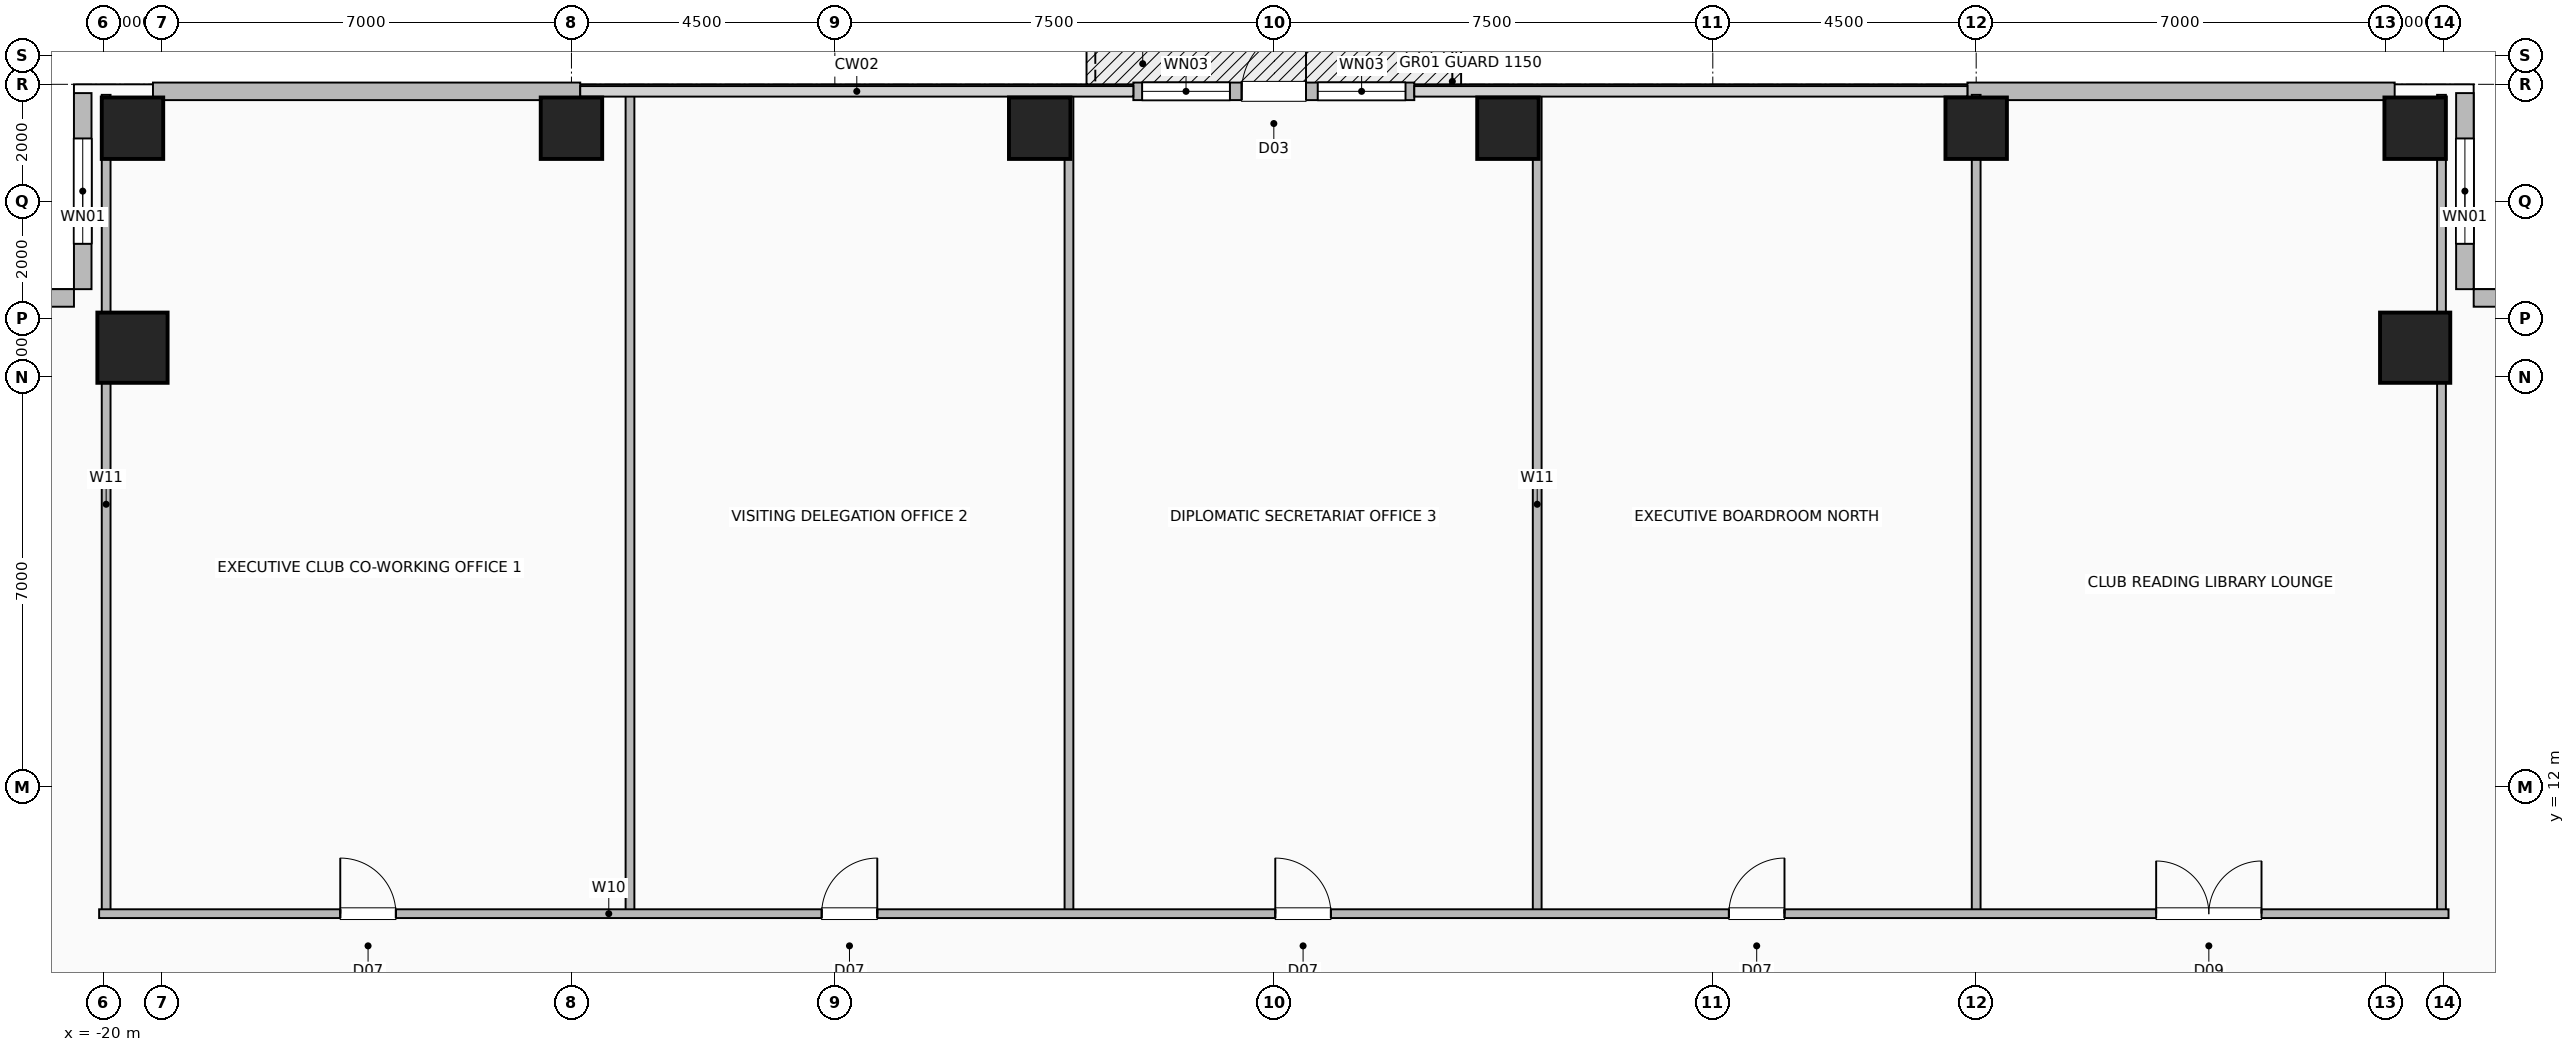
"""IFC4 building model, lengths in metres.
Left out: names, types, materials, properties, quantities, classifications, styles, units other than length and angle.
Written with IfcOpenShell. Run it as: python <this file> out.ifc"""

import sys

from ifc_helpers import new_model, si_unit, direction, frame, frame_2d, origin, origin_2d, place, context, subcontext, project, spatial, rectangle, hollow_rectangle, extrude, element, fill, save


model = new_model("IFC4")
c1 = context("Model", 3, precision=1e-05, world=origin(), true_north=direction((0.0, 1.0)))
c2 = subcontext(c1, "Body", "Model", "MODEL_VIEW")
j1 = project(units=[si_unit("LENGTHUNIT", "METRE"), si_unit("PLANEANGLEUNIT", "RADIAN")], contexts=[c1])
p1 = place(None, origin())
s1 = spatial("IfcSite", under=j1, at=p1, CompositionType="ELEMENT")
p2 = place(p1, origin())
s2 = spatial("IfcBuilding", under=s1, at=p2, CompositionType="ELEMENT")
p3 = place(p2, frame((0.0, 0.0, 65.5)))
s3 = spatial("IfcBuildingStorey", under=s2, at=p3, CompositionType="ELEMENT", Elevation=65.5)
for number, where, z_axis, x_axis in (
    (1, (-19.5, 23.25, 0.0), (0.0, 0.0, 1.0), (1.0, 0.0, 0.0)),
    (2, (-12.0, 23.25, 0.0), (0.0, 0.0, 1.0), (1.0, 0.0, 0.0)),
    (3, (-4.0, 23.25, 0.0), (0.0, 0.0, 1.0), (1.0, 0.0, 0.0)),
    (4, (4.0, 23.25, 0.0), (0.0, 0.0, 1.0), (1.0, 0.0, 0.0)),
    (5, (12.0, 23.25, 0.0), (0.0, 0.0, 1.0), (1.0, 0.0, 0.0)),
    (6, (19.5, 23.25, 0.0), (0.0, 0.0, 1.0), (1.0, 0.0, 0.0)),
):
    element("IfcColumn", number, at=place(p3, frame(where, z_axis=z_axis, x_axis=x_axis)), inside=s3, PredefinedType="COLUMN", context=c2, shape_type="SweptSolid", body=[
        extrude(hollow_rectangle(XDim=1.05, YDim=1.05, WallThickness=0.05, at=origin_2d()), origin(), (0.0, 0.0, 1.0), 3.5),
    ])
for number, where, z_axis, x_axis in (
    (7, (19.5, 19.5, 0.0), (0.0, 0.0, 1.0), (1.0, 0.0, 0.0)),
    (8, (-19.5, 19.5, 0.0), (0.0, 0.0, 1.0), (1.0, 0.0, 0.0)),
):
    element("IfcColumn", number, at=place(p3, frame(where, z_axis=z_axis, x_axis=x_axis)), inside=s3, PredefinedType="COLUMN", context=c2, shape_type="SweptSolid", body=[
        extrude(hollow_rectangle(XDim=1.2, YDim=1.2, WallThickness=0.055, at=origin_2d()), origin(), (0.0, 0.0, 1.0), 3.5),
    ])
for number, where, z_axis, x_axis in (
    (9, (-19.15, 23.88, 0.0), (0.0, 0.0, 1.0), (1.0, 0.0, 0.0)),
    (10, (11.85, 23.88, 0.0), (0.0, 0.0, 1.0), (1.0, 0.0, 0.0)),
):
    element("IfcWall", number, at=place(p3, frame(where, z_axis=z_axis, x_axis=x_axis)), inside=s3, PredefinedType="SOLIDWALL", context=c2, shape_type="SweptSolid", body=[
        extrude(rectangle(XDim=7.3, YDim=0.3, at=frame_2d((3.65, 0.0))), origin(), (0.0, 0.0, 1.0), 3.25),
    ])
p4 = place(p3, frame((-2.4, 23.88, 0.0), z_axis=(0.0, 0.0, 1.0), x_axis=(1.0, 0.0, 0.0)))
e11 = element("IfcWall", 11, at=p4, inside=s3, PredefinedType="SOLIDWALL", context=c2, shape_type="SweptSolid", body=[
    extrude(rectangle(XDim=4.8, YDim=0.3, at=frame_2d((2.4, 0.0))), origin(), (0.0, 0.0, 1.0), 3.25),
])
p5 = place(p4, frame((1.85, 0.0, 0.0)))
e12 = element("IfcOpeningElement", 12, at=p5, cuts=e11, PredefinedType="OPENING", context=c2, shape_type="SweptSolid", body=[
    extrude(rectangle(XDim=1.1, YDim=2.2, at=frame_2d((0.55, 1.1))), frame((0.0, 0.16, 0.0), z_axis=(0.0, -1.0, 0.0), x_axis=(1.0, 0.0, 0.0)), (0.0, 0.0, 1.0), 0.32),
])
p6 = place(p4, frame((0.15, 0.0, 0.85)))
e13 = element("IfcOpeningElement", 13, at=p6, cuts=e11, PredefinedType="OPENING", context=c2, shape_type="SweptSolid", body=[
    extrude(rectangle(XDim=1.5, YDim=1.8, at=frame_2d((0.75, 0.9))), frame((0.0, 0.16, 0.0), z_axis=(0.0, -1.0, 0.0), x_axis=(1.0, 0.0, 0.0)), (0.0, 0.0, 1.0), 0.32),
])
p7 = place(p4, frame((3.15, 0.0, 0.85)))
e14 = element("IfcOpeningElement", 14, at=p7, cuts=e11, PredefinedType="OPENING", context=c2, shape_type="SweptSolid", body=[
    extrude(rectangle(XDim=1.5, YDim=1.8, at=frame_2d((0.75, 0.9))), frame((0.0, 0.16, 0.0), z_axis=(0.0, -1.0, 0.0), x_axis=(1.0, 0.0, 0.0)), (0.0, 0.0, 1.0), 0.32),
])
p8 = place(p3, frame((20.35, 23.85, 0.0), z_axis=(0.0, 0.0, 1.0), x_axis=(0.0, -1.0, 0.0)))
e15 = element("IfcWall", 15, at=p8, inside=s3, PredefinedType="SOLIDWALL", context=c2, shape_type="SweptSolid", body=[
    extrude(rectangle(XDim=3.35, YDim=0.3, at=frame_2d((1.675, 0.0))), origin(), (0.0, 0.0, 1.0), 3.25),
])
p9 = place(p8, frame((0.775, 0.0, 0.9)))
e16 = element("IfcOpeningElement", 16, at=p9, cuts=e15, PredefinedType="OPENING", context=c2, shape_type="SweptSolid", body=[
    extrude(rectangle(XDim=1.8, YDim=1.8, at=frame_2d((0.9, 0.9))), frame((0.0, 0.16, 0.0), z_axis=(0.0, -1.0, 0.0), x_axis=(1.0, 0.0, 0.0)), (0.0, 0.0, 1.0), 0.32),
])
p10 = place(p3, frame((23.85, 20.35, 0.0), z_axis=(0.0, 0.0, 1.0), x_axis=(-1.0, 0.0, 0.0)))
e17 = element("IfcWall", 17, at=p10, inside=s3, PredefinedType="SOLIDWALL", context=c2, shape_type="SweptSolid", body=[
    extrude(rectangle(XDim=3.35, YDim=0.3, at=frame_2d((1.675, 0.0))), origin(), (0.0, 0.0, 1.0), 3.25),
])
p11 = place(p3, frame((-20.35, 23.85, 0.0), z_axis=(0.0, 0.0, 1.0), x_axis=(0.0, -1.0, 0.0)))
e18 = element("IfcWall", 18, at=p11, inside=s3, PredefinedType="SOLIDWALL", context=c2, shape_type="SweptSolid", body=[
    extrude(rectangle(XDim=3.35, YDim=0.3, at=frame_2d((1.675, 0.0))), origin(), (0.0, 0.0, 1.0), 3.25),
])
p12 = place(p11, frame((0.775, 0.0, 0.9)))
e19 = element("IfcOpeningElement", 19, at=p12, cuts=e18, PredefinedType="OPENING", context=c2, shape_type="SweptSolid", body=[
    extrude(rectangle(XDim=1.8, YDim=1.8, at=frame_2d((0.9, 0.9))), frame((0.0, 0.16, 0.0), z_axis=(0.0, -1.0, 0.0), x_axis=(1.0, 0.0, 0.0)), (0.0, 0.0, 1.0), 0.32),
])
p13 = place(p3, frame((-23.85, 20.35, 0.0), z_axis=(0.0, 0.0, 1.0), x_axis=(1.0, 0.0, 0.0)))
e20 = element("IfcWall", 20, at=p13, inside=s3, PredefinedType="SOLIDWALL", context=c2, shape_type="SweptSolid", body=[
    extrude(rectangle(XDim=3.35, YDim=0.3, at=frame_2d((1.675, 0.0))), origin(), (0.0, 0.0, 1.0), 3.25),
])
for number, where, z_axis, x_axis in (
    (21, (-19.95, 9.83, 0.0), (0.0, 0.0, 1.0), (0.0, 1.0, 0.0)),
    (22, (-11.0, 9.83, 0.0), (0.0, 0.0, 1.0), (0.0, 1.0, 0.0)),
    (23, (-3.5, 9.83, 0.0), (0.0, 0.0, 1.0), (0.0, 1.0, 0.0)),
    (24, (4.5, 9.83, 0.0), (0.0, 0.0, 1.0), (0.0, 1.0, 0.0)),
    (25, (12.0, 9.83, 0.0), (0.0, 0.0, 1.0), (0.0, 1.0, 0.0)),
    (26, (19.95, 9.83, 0.0), (0.0, 0.0, 1.0), (0.0, 1.0, 0.0)),
):
    element("IfcWall", number, at=place(p3, frame(where, z_axis=z_axis, x_axis=x_axis)), inside=s3, PredefinedType="PARTITIONING", context=c2, shape_type="SweptSolid", body=[
        extrude(rectangle(XDim=13.99, YDim=0.15, at=frame_2d((6.995, 0.0))), origin(), (0.0, 0.0, 1.0), 3.25),
    ])
p14 = place(p3, frame((-20.07, 9.83, 0.0), z_axis=(0.0, 0.0, 1.0), x_axis=(1.0, 0.0, 0.0)))
e27 = element("IfcWall", 27, at=p14, inside=s3, PredefinedType="PARTITIONING", context=c2, shape_type="SweptSolid", body=[
    extrude(rectangle(XDim=40.14, YDim=0.15, at=frame_2d((20.07, 0.0))), origin(), (0.0, 0.0, 1.0), 3.25),
])
p15 = place(p14, frame((4.12, 0.0, 0.0)))
e28 = element("IfcOpeningElement", 28, at=p15, cuts=e27, PredefinedType="OPENING", context=c2, shape_type="SweptSolid", body=[
    extrude(rectangle(XDim=0.95, YDim=2.06, at=frame_2d((0.475, 1.03))), frame((0.0, 0.085, 0.0), z_axis=(0.0, -1.0, 0.0), x_axis=(1.0, 0.0, 0.0)), (0.0, 0.0, 1.0), 0.17),
])
p16 = place(p14, frame((12.345, 0.0, 0.0)))
e29 = element("IfcOpeningElement", 29, at=p16, cuts=e27, PredefinedType="OPENING", context=c2, shape_type="SweptSolid", body=[
    extrude(rectangle(XDim=0.95, YDim=2.06, at=frame_2d((0.475, 1.03))), frame((0.0, 0.085, 0.0), z_axis=(0.0, -1.0, 0.0), x_axis=(1.0, 0.0, 0.0)), (0.0, 0.0, 1.0), 0.17),
])
p17 = place(p14, frame((20.095, 0.0, 0.0)))
e30 = element("IfcOpeningElement", 30, at=p17, cuts=e27, PredefinedType="OPENING", context=c2, shape_type="SweptSolid", body=[
    extrude(rectangle(XDim=0.95, YDim=2.06, at=frame_2d((0.475, 1.03))), frame((0.0, 0.085, 0.0), z_axis=(0.0, -1.0, 0.0), x_axis=(1.0, 0.0, 0.0)), (0.0, 0.0, 1.0), 0.17),
])
p18 = place(p14, frame((27.845, 0.0, 0.0)))
e31 = element("IfcOpeningElement", 31, at=p18, cuts=e27, PredefinedType="OPENING", context=c2, shape_type="SweptSolid", body=[
    extrude(rectangle(XDim=0.95, YDim=2.06, at=frame_2d((0.475, 1.03))), frame((0.0, 0.085, 0.0), z_axis=(0.0, -1.0, 0.0), x_axis=(1.0, 0.0, 0.0)), (0.0, 0.0, 1.0), 0.17),
])
p19 = place(p14, frame((35.145, 0.0, 0.0)))
e32 = element("IfcOpeningElement", 32, at=p19, cuts=e27, PredefinedType="OPENING", context=c2, shape_type="SweptSolid", body=[
    extrude(rectangle(XDim=1.8, YDim=2.08, at=frame_2d((0.9, 1.04))), frame((0.0, 0.085, 0.0), z_axis=(0.0, -1.0, 0.0), x_axis=(1.0, 0.0, 0.0)), (0.0, 0.0, 1.0), 0.17),
])
p20 = place(p5, origin())
e33 = element("IfcDoor", 33, at=p20, inside=s3, OperationType="SINGLE_SWING_RIGHT", PredefinedType="DOOR", context=c2, shape_type="SweptSolid", body=[
    extrude(rectangle(XDim=1.1, YDim=2.2, at=frame_2d((0.55, 1.1))), frame((0.0, 0.025, 0.0), z_axis=(0.0, -1.0, 0.0), x_axis=(1.0, 0.0, 0.0)), (0.0, 0.0, 1.0), 0.05),
])
fill(e12, e33)
p21 = place(p6, origin())
e34 = element("IfcWindow", 34, at=p21, inside=s3, PartitioningType="SINGLE_PANEL", PredefinedType="WINDOW", context=c2, shape_type="SweptSolid", body=[
    extrude(rectangle(XDim=1.5, YDim=1.8, at=frame_2d((0.75, 0.9))), frame((0.0, 0.03, 0.0), z_axis=(0.0, -1.0, 0.0), x_axis=(1.0, 0.0, 0.0)), (0.0, 0.0, 1.0), 0.06),
])
fill(e13, e34)
p22 = place(p7, origin())
e35 = element("IfcWindow", 35, at=p22, inside=s3, PartitioningType="SINGLE_PANEL", PredefinedType="WINDOW", context=c2, shape_type="SweptSolid", body=[
    extrude(rectangle(XDim=1.5, YDim=1.8, at=frame_2d((0.75, 0.9))), frame((0.0, 0.03, 0.0), z_axis=(0.0, -1.0, 0.0), x_axis=(1.0, 0.0, 0.0)), (0.0, 0.0, 1.0), 0.06),
])
fill(e14, e35)
p23 = place(p9, origin())
e36 = element("IfcWindow", 36, at=p23, inside=s3, PartitioningType="SINGLE_PANEL", PredefinedType="WINDOW", context=c2, shape_type="SweptSolid", body=[
    extrude(rectangle(XDim=1.8, YDim=1.8, at=frame_2d((0.9, 0.9))), frame((0.0, 0.03, 0.0), z_axis=(0.0, -1.0, 0.0), x_axis=(1.0, 0.0, 0.0)), (0.0, 0.0, 1.0), 0.06),
])
fill(e16, e36)
p24 = place(p12, origin())
e37 = element("IfcWindow", 37, at=p24, inside=s3, PartitioningType="SINGLE_PANEL", PredefinedType="WINDOW", context=c2, shape_type="SweptSolid", body=[
    extrude(rectangle(XDim=1.8, YDim=1.8, at=frame_2d((0.9, 0.9))), frame((0.0, 0.03, 0.0), z_axis=(0.0, -1.0, 0.0), x_axis=(1.0, 0.0, 0.0)), (0.0, 0.0, 1.0), 0.06),
])
fill(e19, e37)
p25 = place(p15, origin())
e38 = element("IfcDoor", 38, at=p25, inside=s3, OperationType="SINGLE_SWING_LEFT", PredefinedType="DOOR", context=c2, shape_type="SweptSolid", body=[
    extrude(rectangle(XDim=0.95, YDim=2.06, at=frame_2d((0.475, 1.03))), frame((0.0, 0.025, 0.0), z_axis=(0.0, -1.0, 0.0), x_axis=(1.0, 0.0, 0.0)), (0.0, 0.0, 1.0), 0.05),
])
fill(e28, e38)
p26 = place(p16, origin())
e39 = element("IfcDoor", 39, at=p26, inside=s3, OperationType="SINGLE_SWING_RIGHT", PredefinedType="DOOR", context=c2, shape_type="SweptSolid", body=[
    extrude(rectangle(XDim=0.95, YDim=2.06, at=frame_2d((0.475, 1.03))), frame((0.0, 0.025, 0.0), z_axis=(0.0, -1.0, 0.0), x_axis=(1.0, 0.0, 0.0)), (0.0, 0.0, 1.0), 0.05),
])
fill(e29, e39)
p27 = place(p17, origin())
e40 = element("IfcDoor", 40, at=p27, inside=s3, OperationType="SINGLE_SWING_LEFT", PredefinedType="DOOR", context=c2, shape_type="SweptSolid", body=[
    extrude(rectangle(XDim=0.95, YDim=2.06, at=frame_2d((0.475, 1.03))), frame((0.0, 0.025, 0.0), z_axis=(0.0, -1.0, 0.0), x_axis=(1.0, 0.0, 0.0)), (0.0, 0.0, 1.0), 0.05),
])
fill(e30, e40)
p28 = place(p18, origin())
e41 = element("IfcDoor", 41, at=p28, inside=s3, OperationType="SINGLE_SWING_RIGHT", PredefinedType="DOOR", context=c2, shape_type="SweptSolid", body=[
    extrude(rectangle(XDim=0.95, YDim=2.06, at=frame_2d((0.475, 1.03))), frame((0.0, 0.025, 0.0), z_axis=(0.0, -1.0, 0.0), x_axis=(1.0, 0.0, 0.0)), (0.0, 0.0, 1.0), 0.05),
])
fill(e31, e41)
p29 = place(p19, origin())
e42 = element("IfcDoor", 42, at=p29, inside=s3, OperationType="DOUBLE_DOOR_SINGLE_SWING", PredefinedType="DOOR", context=c2, shape_type="SweptSolid", body=[
    extrude(rectangle(XDim=1.8, YDim=2.08, at=frame_2d((0.9, 1.04))), frame((0.0, 0.025, 0.0), z_axis=(0.0, -1.0, 0.0), x_axis=(1.0, 0.0, 0.0)), (0.0, 0.0, 1.0), 0.05),
])
fill(e32, e42)
save(model, sys.argv[1])
